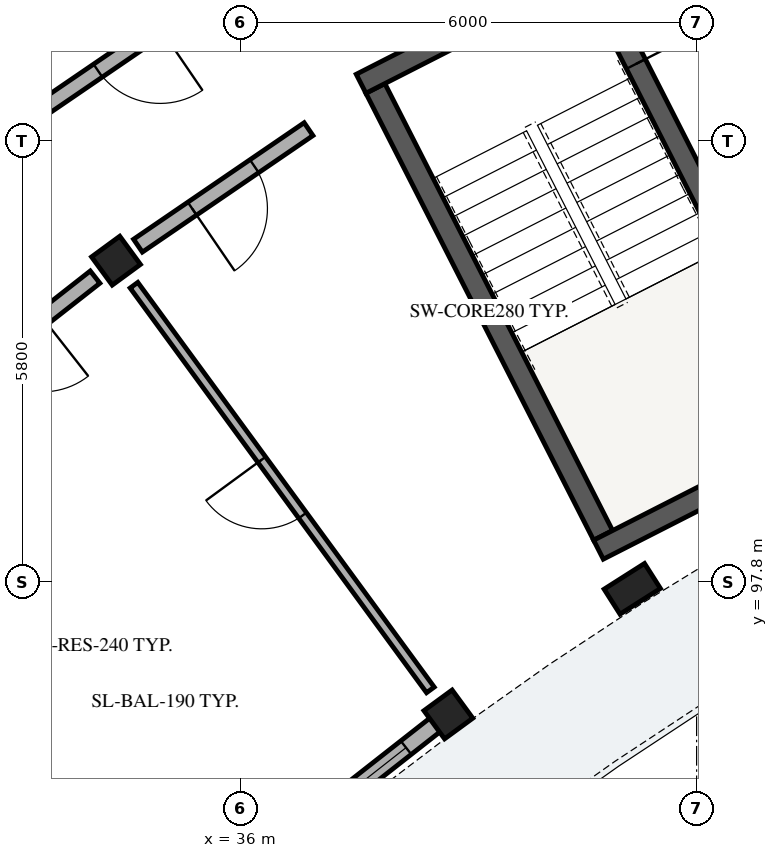
"""IFC4 building model, lengths in metres.
Left out: names, types, materials, properties, quantities, classifications, styles, units other than length and angle.
Written with IfcOpenShell. Run it as: python <this file> out.ifc"""

import sys

from ifc_helpers import new_model, si_unit, direction, frame, frame_2d, origin, origin_2d, place, context, subcontext, project, spatial, rectangle, extrude, element, fill, save


model = new_model("IFC4")
c1 = context("Model", 3, precision=1e-05, world=origin(), true_north=direction((0.0, 1.0)))
c2 = subcontext(c1, "Body", "Model", "MODEL_VIEW")
j1 = project(units=[si_unit("LENGTHUNIT", "METRE"), si_unit("PLANEANGLEUNIT", "RADIAN")], contexts=[c1])
p1 = place(None, origin())
s1 = spatial("IfcSite", under=j1, at=p1, CompositionType="ELEMENT")
p2 = place(p1, origin())
s2 = spatial("IfcBuilding", under=s1, at=p2, CompositionType="ELEMENT")
p3 = place(p2, frame((0.0, 0.0, 45.8)))
s3 = spatial("IfcBuildingStorey", under=s2, at=p3, CompositionType="ELEMENT", Elevation=45.8)
p4 = place(p3, frame((37.773, 104.296, 0.0), z_axis=(0.0, 0.0, 1.0), x_axis=(0.453992276384, -0.891005618941, 0.0)))
e1 = element("IfcWall", 1, at=p4, inside=s3, PredefinedType="SHEAR", context=c2, shape_type="SweptSolid", body=[
    extrude(rectangle(XDim=6.6, YDim=0.28, at=frame_2d((3.3, 0.0))), origin(), (0.0, 0.0, 1.0), 3.11),
])
for number, where, z_axis, x_axis in (
    (2, (40.709, 98.227, 0.0), (0.0, 0.0, 1.0), (0.891, 0.454, 0.0)),
    (3, (37.585, 104.357, 0.0), (0.0, 0.0, 1.0), (0.891, 0.454, 0.0)),
):
    element("IfcWall", number, at=place(p3, frame(where, z_axis=z_axis, x_axis=x_axis)), inside=s3, PredefinedType="SHEAR", context=c2, shape_type="SweptSolid", body=[
        extrude(rectangle(XDim=3.48, YDim=0.28, at=frame_2d((1.74, 0.0))), origin(), (0.0, 0.0, 1.0), 3.11),
    ])
p5 = place(p3, frame((40.625, 105.748, 0.0), z_axis=(0.0, 0.0, 1.0), x_axis=(0.453992276384, -0.891005618941, 0.0)))
e4 = element("IfcWall", 4, at=p5, inside=s3, PredefinedType="SHEAR", context=c2, shape_type="SweptSolid", body=[
    extrude(rectangle(XDim=6.6, YDim=0.28, at=frame_2d((3.3, 0.0))), origin(), (0.0, 0.0, 1.0), 3.11),
])
p6 = place(p5, frame((0.22, 0.0, 0.0)))
e5 = element("IfcOpeningElement", 5, at=p6, cuts=e4, PredefinedType="OPENING", context=c2, shape_type="SweptSolid", body=[
    extrude(rectangle(XDim=1.05, YDim=2.15, at=frame_2d((0.525, 1.075))), frame((0.0, 0.15, 0.0), z_axis=(0.0, -1.0, 0.0), x_axis=(1.0, 0.0, 0.0)), (0.0, 0.0, 1.0), 0.3),
])
p7 = place(p3, frame((41.153, 97.712, 0.0), z_axis=(0.0, 0.0, 1.0), x_axis=(-0.536481603385, 0.843912015099, 0.0)))
e6 = element("IfcColumn", 6, at=p7, inside=s3, PredefinedType="PILASTER", context=c2, shape_type="SweptSolid", body=[
    extrude(rectangle(XDim=0.39, YDim=0.63, at=origin_2d()), origin(), (0.0, 0.0, 1.0), 3.12),
])
for number, where, z_axis, x_axis in (
    (7, (38.734, 96.059, 0.0), (0.0, 0.0, 1.0), (-0.591, 0.807, 0.0)),
    (8, (34.361, 102.029, 0.0), (0.0, 0.0, 1.0), (-0.591, 0.807, 0.0)),
):
    element("IfcColumn", number, at=place(p3, frame(where, z_axis=z_axis, x_axis=x_axis)), inside=s3, PredefinedType="COLUMN", context=c2, shape_type="SweptSolid", body=[
        extrude(rectangle(XDim=0.46, YDim=0.46, at=origin_2d()), origin(), (0.0, 0.0, 1.0), 3.12),
    ])
p8 = place(p3, frame((38.576, 95.936, 0.0), z_axis=(0.0, 0.0, 1.0), x_axis=(-0.786839825132, -0.617157264874, 0.0)))
e9 = element("IfcWall", 9, at=p8, inside=s3, PredefinedType="SOLIDWALL", context=c2, shape_type="SweptSolid", body=[
    extrude(rectangle(XDim=2.565, YDim=0.225, at=frame_2d((1.283, 0.0))), origin(), (0.0, 0.0, 1.0), 2.355),
])
p9 = place(p8, frame((0.508, 0.0, 0.35)))
e10 = element("IfcOpeningElement", 10, at=p9, cuts=e9, PredefinedType="OPENING", context=c2, shape_type="SweptSolid", body=[
    extrude(rectangle(XDim=1.55, YDim=1.75, at=frame_2d((0.775, 0.875))), frame((0.0, 0.123, 0.0), z_axis=(0.0, -1.0, 0.0), x_axis=(1.0, 0.0, 0.0)), (0.0, 0.0, 1.0), 0.245),
])
p10 = place(p3, frame((35.714, 105.616, 0.0), z_axis=(0.0, 0.0, 1.0), x_axis=(-0.825779671787, -0.563992848947, 0.0)))
e11 = element("IfcWall", 11, at=p10, inside=s3, PredefinedType="PARTITIONING", context=c2, shape_type="SweptSolid", body=[
    extrude(rectangle(XDim=2.863, YDim=0.205, at=frame_2d((1.432, 0.0))), origin(), (0.0, 0.0, 1.0), 2.37),
])
p11 = place(p10, frame((0.937, 0.0, 0.0)))
e12 = element("IfcOpeningElement", 12, at=p11, cuts=e11, PredefinedType="OPENING", context=c2, shape_type="SweptSolid", body=[
    extrude(rectangle(XDim=0.99, YDim=2.16, at=frame_2d((0.495, 1.08))), frame((0.0, 0.113, 0.0), z_axis=(0.0, -1.0, 0.0), x_axis=(1.0, 0.0, 0.0)), (0.0, 0.0, 1.0), 0.225),
])
p12 = place(p3, frame((36.895, 103.76, 0.0), z_axis=(0.0, 0.0, 1.0), x_axis=(-0.825752009056, -0.56403334967, 0.0)))
e13 = element("IfcWall", 13, at=p12, inside=s3, PredefinedType="PARTITIONING", context=c2, shape_type="SweptSolid", body=[
    extrude(rectangle(XDim=2.718, YDim=0.205, at=frame_2d((1.359, 0.0))), origin(), (0.0, 0.0, 1.0), 2.37),
])
p13 = place(p12, frame((0.864, 0.0, 0.0)))
e14 = element("IfcOpeningElement", 14, at=p13, cuts=e13, PredefinedType="OPENING", context=c2, shape_type="SweptSolid", body=[
    extrude(rectangle(XDim=0.99, YDim=2.16, at=frame_2d((0.495, 1.08))), frame((0.0, 0.113, 0.0), z_axis=(0.0, -1.0, 0.0), x_axis=(1.0, 0.0, 0.0)), (0.0, 0.0, 1.0), 0.225),
])
p14 = place(p3, frame((38.497, 96.382, 0.0), z_axis=(0.0, 0.0, 1.0), x_axis=(-0.590924179316, 0.806727100263, 0.0)))
e15 = element("IfcWall", 15, at=p14, inside=s3, PredefinedType="PARTITIONING", context=c2, shape_type="SweptSolid", body=[
    extrude(rectangle(XDim=6.6, YDim=0.125, at=frame_2d((3.3, 0.0))), origin(), (0.0, 0.0, 1.0), 2.37),
])
p15 = place(p14, frame((2.845, 0.0, 0.0)))
e16 = element("IfcOpeningElement", 16, at=p15, cuts=e15, PredefinedType="OPENING", context=c2, shape_type="SweptSolid", body=[
    extrude(rectangle(XDim=0.91, YDim=2.1, at=frame_2d((0.455, 1.05))), frame((0.0, 0.073, 0.0), z_axis=(0.0, -1.0, 0.0), x_axis=(1.0, 0.0, 0.0)), (0.0, 0.0, 1.0), 0.145),
])
p16 = place(p3, frame((34.085, 101.813, 0.0), z_axis=(0.0, 0.0, 1.0), x_axis=(-0.786835457019, -0.617162833924, 0.0)))
e17 = element("IfcWall", 17, at=p16, inside=s3, PredefinedType="PARTITIONING", context=c2, shape_type="SweptSolid", body=[
    extrude(rectangle(XDim=2.718, YDim=0.205, at=frame_2d((1.359, 0.0))), origin(), (0.0, 0.0, 1.0), 2.37),
])
p17 = place(p16, frame((0.874, 0.0, 0.0)))
e18 = element("IfcOpeningElement", 18, at=p17, cuts=e17, PredefinedType="OPENING", context=c2, shape_type="SweptSolid", body=[
    extrude(rectangle(XDim=0.97, YDim=2.15, at=frame_2d((0.485, 1.075))), frame((0.0, 0.113, 0.0), z_axis=(0.0, -1.0, 0.0), x_axis=(1.0, 0.0, 0.0)), (0.0, 0.0, 1.0), 0.225),
])
p18 = place(p3, frame((33.97, 92.583, 0.0), z_axis=(0.0, 0.0, 1.0), x_axis=(-0.691872422458, 0.722019771919, 0.0)))
e19 = element("IfcWall", 19, at=p18, inside=s3, PredefinedType="PARTITIONING", context=c2, shape_type="SweptSolid", body=[
    extrude(rectangle(XDim=6.6, YDim=0.125, at=frame_2d((3.3, 0.0))), origin(), (0.0, 0.0, 1.0), 2.37),
])
p19 = place(p18, frame((2.865, 0.0, 0.0)))
e20 = element("IfcOpeningElement", 20, at=p19, cuts=e19, PredefinedType="OPENING", context=c2, shape_type="SweptSolid", body=[
    extrude(rectangle(XDim=0.87, YDim=2.08, at=frame_2d((0.435, 1.04))), frame((0.0, 0.073, 0.0), z_axis=(0.0, -1.0, 0.0), x_axis=(1.0, 0.0, 0.0)), (0.0, 0.0, 1.0), 0.145),
])
p20 = place(p9, origin())
e21 = element("IfcWindow", 21, at=p20, inside=s3, PartitioningType="SINGLE_PANEL", PredefinedType="WINDOW", context=c2, shape_type="SweptSolid", body=[
    extrude(rectangle(XDim=1.55, YDim=1.75, at=frame_2d((0.775, 0.875))), frame((0.0, 0.03, 0.0), z_axis=(0.0, -1.0, 0.0), x_axis=(1.0, 0.0, 0.0)), (0.0, 0.0, 1.0), 0.06),
])
fill(e10, e21)
p21 = place(p6, origin())
e22 = element("IfcDoor", 22, at=p21, inside=s3, OperationType="SINGLE_SWING_RIGHT", PredefinedType="DOOR", context=c2, shape_type="SweptSolid", body=[
    extrude(rectangle(XDim=1.05, YDim=2.15, at=frame_2d((0.525, 1.075))), frame((0.0, 0.025, 0.0), z_axis=(0.0, -1.0, 0.0), x_axis=(1.0, 0.0, 0.0)), (0.0, 0.0, 1.0), 0.05),
])
fill(e5, e22)
p22 = place(p11, origin())
e23 = element("IfcDoor", 23, at=p22, inside=s3, OperationType="SINGLE_SWING_LEFT", PredefinedType="DOOR", context=c2, shape_type="SweptSolid", body=[
    extrude(rectangle(XDim=0.99, YDim=2.16, at=frame_2d((0.495, 1.08))), frame((0.0, 0.025, 0.0), z_axis=(0.0, -1.0, 0.0), x_axis=(1.0, 0.0, 0.0)), (0.0, 0.0, 1.0), 0.05),
])
fill(e12, e23)
p23 = place(p13, origin())
e24 = element("IfcDoor", 24, at=p23, inside=s3, OperationType="SINGLE_SWING_RIGHT", PredefinedType="DOOR", context=c2, shape_type="SweptSolid", body=[
    extrude(rectangle(XDim=0.99, YDim=2.16, at=frame_2d((0.495, 1.08))), frame((0.0, 0.025, 0.0), z_axis=(0.0, -1.0, 0.0), x_axis=(1.0, 0.0, 0.0)), (0.0, 0.0, 1.0), 0.05),
])
fill(e14, e24)
p24 = place(p15, origin())
e25 = element("IfcDoor", 25, at=p24, inside=s3, OperationType="SINGLE_SWING_RIGHT", PredefinedType="DOOR", context=c2, shape_type="SweptSolid", body=[
    extrude(rectangle(XDim=0.91, YDim=2.1, at=frame_2d((0.455, 1.05))), frame((0.0, 0.025, 0.0), z_axis=(0.0, -1.0, 0.0), x_axis=(1.0, 0.0, 0.0)), (0.0, 0.0, 1.0), 0.05),
])
fill(e16, e25)
save(model, sys.argv[1])
